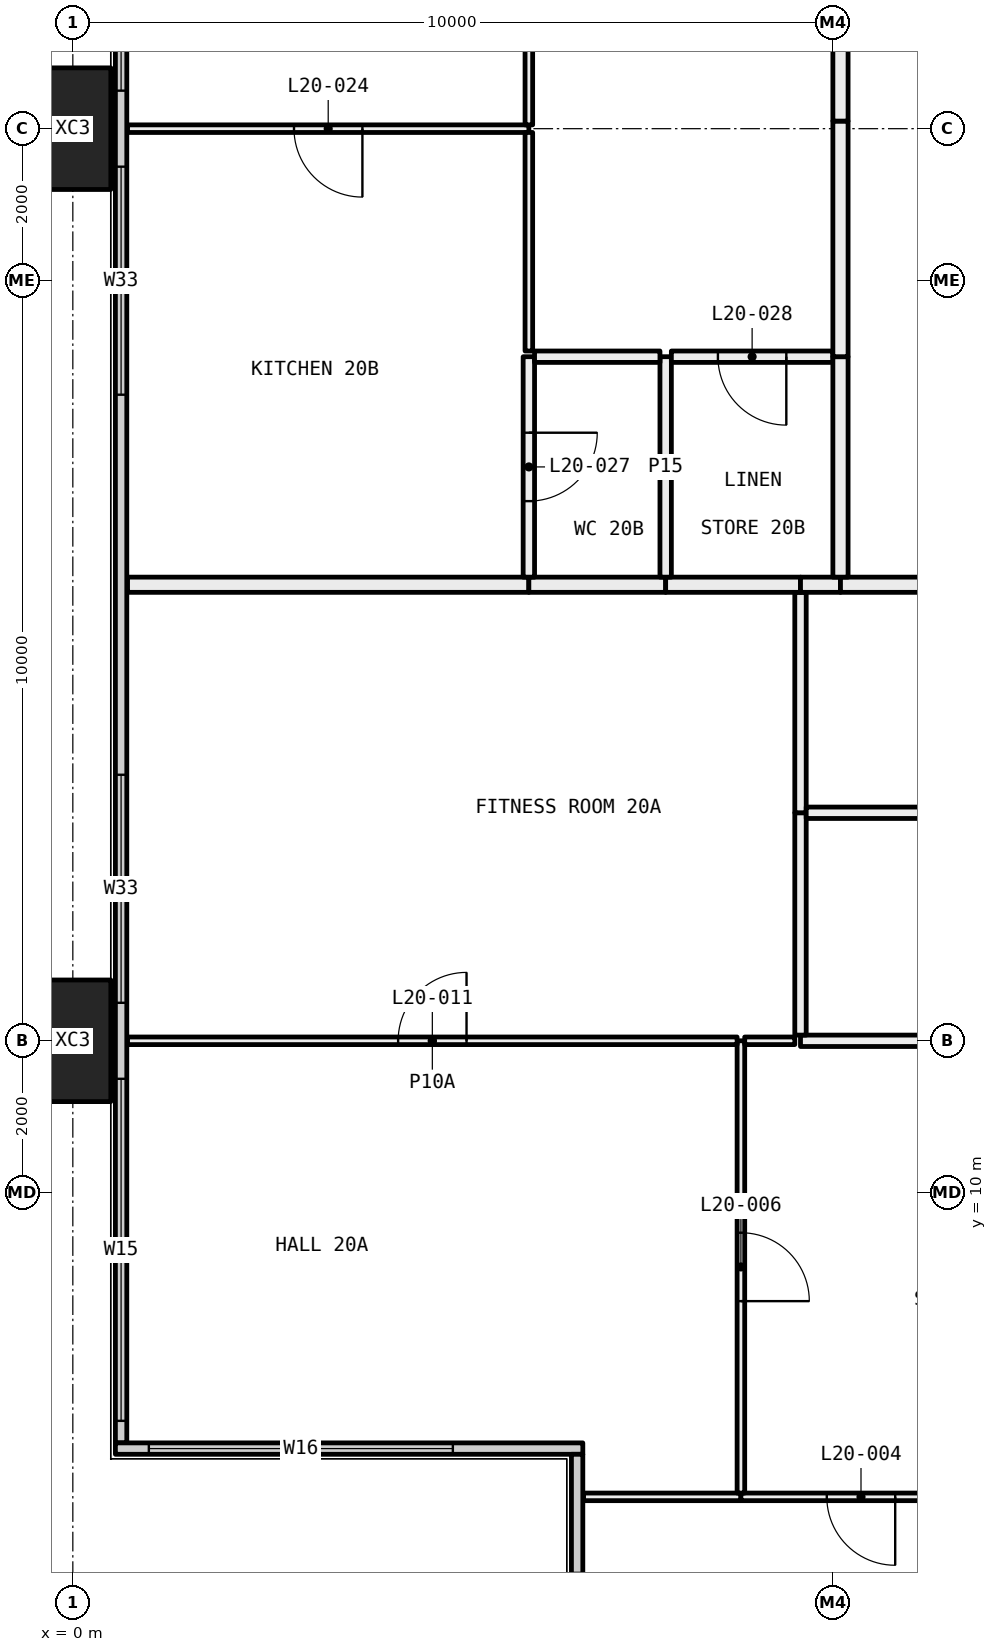
"""IFC4 building model, lengths in metres.
Left out: names, types, materials, properties, quantities, classifications, styles, units other than length and angle.
Written with IfcOpenShell. Run it as: python <this file> out.ifc"""

import sys

from ifc_helpers import new_model, si_unit, direction, frame, frame_2d, origin, origin_2d, place, context, subcontext, project, spatial, rectangle, hollow_rectangle, extrude, element, fill, save


model = new_model("IFC4")
c1 = context("Model", 3, precision=1e-05, world=origin(), true_north=direction((0.0, 1.0)))
c2 = subcontext(c1, "Body", "Model", "MODEL_VIEW")
j1 = project(units=[si_unit("LENGTHUNIT", "METRE"), si_unit("PLANEANGLEUNIT", "RADIAN")], contexts=[c1])
p1 = place(None, origin())
s1 = spatial("IfcSite", under=j1, at=p1, CompositionType="ELEMENT")
p2 = place(p1, origin())
s2 = spatial("IfcBuilding", under=s1, at=p2, CompositionType="ELEMENT")
p3 = place(p2, frame((0.0, 0.0, 81.75)))
s3 = spatial("IfcBuildingStorey", under=s2, at=p3, CompositionType="ELEMENT", Elevation=81.75)
for number, where, z_axis, x_axis in (
    (1, (0.0, 12.0, -0.4), (0.0, 0.0, 1.0), (0.0, 1.0, 0.0)),
    (2, (0.0, 24.0, -0.4), (0.0, 0.0, 1.0), (0.0, 1.0, 0.0)),
):
    element("IfcColumn", number, at=place(p3, frame(where, z_axis=z_axis, x_axis=x_axis)), inside=s3, PredefinedType="COLUMN", context=c2, shape_type="SweptSolid", body=[
        extrude(hollow_rectangle(XDim=1.6, YDim=1.0, WallThickness=0.065, at=origin_2d()), origin(), (0.0, 0.0, 1.0), 3.45),
    ])
p4 = place(p3, frame((0.635, 6.71, 0.0), z_axis=(0.0, 0.0, 1.0), x_axis=(0.0, 1.0, 0.0)))
e3 = element("IfcWall", 3, at=p4, inside=s3, PredefinedType="ELEMENTEDWALL", context=c2, shape_type="SweptSolid", body=[
    extrude(rectangle(XDim=34.58, YDim=0.15, at=frame_2d((17.29, 0.0))), origin(), (0.0, 0.0, 1.0), 3.05),
])
p5 = place(p4, frame((0.29, 0.0, 0.45)))
e4 = element("IfcOpeningElement", 4, at=p5, cuts=e3, PredefinedType="OPENING", context=c2, shape_type="SweptSolid", body=[
    extrude(rectangle(XDim=4.5, YDim=2.55, at=frame_2d((2.25, 1.275))), frame((0.0, 0.085, 0.0), z_axis=(0.0, -1.0, 0.0), x_axis=(1.0, 0.0, 0.0)), (0.0, 0.0, 1.0), 0.17),
])
p6 = place(p4, frame((5.79, 0.0, 0.45)))
e5 = element("IfcOpeningElement", 5, at=p6, cuts=e3, PredefinedType="OPENING", context=c2, shape_type="SweptSolid", body=[
    extrude(rectangle(XDim=3.0, YDim=2.55, at=frame_2d((1.5, 1.275))), frame((0.0, 0.085, 0.0), z_axis=(0.0, -1.0, 0.0), x_axis=(1.0, 0.0, 0.0)), (0.0, 0.0, 1.0), 0.17),
])
p7 = place(p4, frame((13.79, 0.0, 0.45)))
e6 = element("IfcOpeningElement", 6, at=p7, cuts=e3, PredefinedType="OPENING", context=c2, shape_type="SweptSolid", body=[
    extrude(rectangle(XDim=3.0, YDim=2.55, at=frame_2d((1.5, 1.275))), frame((0.0, 0.085, 0.0), z_axis=(0.0, -1.0, 0.0), x_axis=(1.0, 0.0, 0.0)), (0.0, 0.0, 1.0), 0.17),
])
p8 = place(p4, frame((17.79, 0.0, 0.45)))
e7 = element("IfcOpeningElement", 7, at=p8, cuts=e3, PredefinedType="OPENING", context=c2, shape_type="SweptSolid", body=[
    extrude(rectangle(XDim=3.0, YDim=2.55, at=frame_2d((1.5, 1.275))), frame((0.0, 0.085, 0.0), z_axis=(0.0, -1.0, 0.0), x_axis=(1.0, 0.0, 0.0)), (0.0, 0.0, 1.0), 0.17),
])
p9 = place(p4, frame((26.79, 0.0, 0.45)))
e8 = element("IfcOpeningElement", 8, at=p9, cuts=e3, PredefinedType="OPENING", context=c2, shape_type="SweptSolid", body=[
    extrude(rectangle(XDim=2.0, YDim=2.55, at=frame_2d((1.0, 1.275))), frame((0.0, 0.085, 0.0), z_axis=(0.0, -1.0, 0.0), x_axis=(1.0, 0.0, 0.0)), (0.0, 0.0, 1.0), 0.17),
])
p10 = place(p4, frame((29.79, 0.0, 0.45)))
e9 = element("IfcOpeningElement", 9, at=p10, cuts=e3, PredefinedType="OPENING", context=c2, shape_type="SweptSolid", body=[
    extrude(rectangle(XDim=4.5, YDim=2.55, at=frame_2d((2.25, 1.275))), frame((0.0, 0.085, 0.0), z_axis=(0.0, -1.0, 0.0), x_axis=(1.0, 0.0, 0.0)), (0.0, 0.0, 1.0), 0.17),
])
p11 = place(p3, frame((0.56, 6.635, 0.0), z_axis=(0.0, 0.0, 1.0), x_axis=(1.0, 0.0, 0.0)))
e10 = element("IfcWall", 10, at=p11, inside=s3, PredefinedType="ELEMENTEDWALL", context=c2, shape_type="SweptSolid", body=[
    extrude(rectangle(XDim=6.15, YDim=0.15, at=frame_2d((3.075, 0.0))), origin(), (0.0, 0.0, 1.0), 3.05),
])
p12 = place(p11, frame((0.44, 0.0, 0.45)))
e11 = element("IfcOpeningElement", 11, at=p12, cuts=e10, PredefinedType="OPENING", context=c2, shape_type="SweptSolid", body=[
    extrude(rectangle(XDim=4.0, YDim=2.55, at=frame_2d((2.0, 1.275))), frame((0.0, 0.085, 0.0), z_axis=(0.0, -1.0, 0.0), x_axis=(1.0, 0.0, 0.0)), (0.0, 0.0, 1.0), 0.17),
])
p13 = place(p3, frame((6.635, 0.71, 0.0), z_axis=(0.0, 0.0, 1.0), x_axis=(0.0, 1.0, 0.0)))
e12 = element("IfcWall", 12, at=p13, inside=s3, PredefinedType="ELEMENTEDWALL", context=c2, shape_type="SweptSolid", body=[
    extrude(rectangle(XDim=5.85, YDim=0.15, at=frame_2d((2.925, 0.0))), origin(), (0.0, 0.0, 1.0), 3.05),
])
p14 = place(p13, frame((0.29, 0.0, 0.45)))
e13 = element("IfcOpeningElement", 13, at=p14, cuts=e12, PredefinedType="OPENING", context=c2, shape_type="SweptSolid", body=[
    extrude(rectangle(XDim=4.0, YDim=2.55, at=frame_2d((2.0, 1.275))), frame((0.0, 0.085, 0.0), z_axis=(0.0, -1.0, 0.0), x_axis=(1.0, 0.0, 0.0)), (0.0, 0.0, 1.0), 0.17),
])
p15 = place(p3, frame((8.79, 6.0, 0.0), z_axis=(0.0, 0.0, 1.0), x_axis=(-1.0, 0.0, 0.0)))
e14 = element("IfcWall", 14, at=p15, inside=s3, PredefinedType="PARTITIONING", context=c2, shape_type="SweptSolid", body=[
    extrude(rectangle(XDim=2.07, YDim=0.1, at=frame_2d((1.035, 0.0))), origin(), (0.0, 0.0, 1.0), 3.05),
])
p16 = place(p3, frame((11.95, 6.0, 0.0), z_axis=(0.0, 0.0, 1.0), x_axis=(-1.0, 0.0, 0.0)))
e15 = element("IfcWall", 15, at=p16, inside=s3, PredefinedType="PARTITIONING", context=c2, shape_type="SweptSolid", body=[
    extrude(rectangle(XDim=3.16, YDim=0.1, at=frame_2d((1.58, 0.0))), origin(), (0.0, 0.0, 1.0), 2.45),
])
p17 = place(p16, frame((1.13, 0.0, 0.0)))
e16 = element("IfcOpeningElement", 16, at=p17, cuts=e15, PredefinedType="OPENING", context=c2, shape_type="SweptSolid", body=[
    extrude(rectangle(XDim=0.9, YDim=2.1, at=frame_2d((0.45, 1.05))), frame((0.0, 0.06, 0.0), z_axis=(0.0, -1.0, 0.0), x_axis=(1.0, 0.0, 0.0)), (0.0, 0.0, 1.0), 0.12),
])
p18 = place(p3, frame((8.79, 6.05, 0.0), z_axis=(0.0, 0.0, 1.0), x_axis=(0.0, 1.0, 0.0)))
e17 = element("IfcWall", 17, at=p18, inside=s3, PredefinedType="PARTITIONING", context=c2, shape_type="SweptSolid", body=[
    extrude(rectangle(XDim=5.95, YDim=0.1, at=frame_2d((2.975, 0.0))), origin(), (0.0, 0.0, 1.0), 2.45),
])
p19 = place(p18, frame((2.525, 0.0, 0.0)))
e18 = element("IfcOpeningElement", 18, at=p19, cuts=e17, PredefinedType="OPENING", context=c2, shape_type="SweptSolid", body=[
    extrude(rectangle(XDim=0.9, YDim=2.1, at=frame_2d((0.45, 1.05))), frame((0.0, 0.06, 0.0), z_axis=(0.0, -1.0, 0.0), x_axis=(1.0, 0.0, 0.0)), (0.0, 0.0, 1.0), 0.12),
])
p20 = place(p3, frame((8.74, 12.0, 0.0), z_axis=(0.0, 0.0, 1.0), x_axis=(-1.0, 0.0, 0.0)))
e19 = element("IfcWall", 19, at=p20, inside=s3, PredefinedType="PARTITIONING", context=c2, shape_type="SweptSolid", body=[
    extrude(rectangle(XDim=8.02, YDim=0.1, at=frame_2d((4.01, 0.0))), origin(), (0.0, 0.0, 1.0), 2.45),
])
p21 = place(p20, frame((3.56, 0.0, 0.0)))
e20 = element("IfcOpeningElement", 20, at=p21, cuts=e19, PredefinedType="OPENING", context=c2, shape_type="SweptSolid", body=[
    extrude(rectangle(XDim=0.9, YDim=2.1, at=frame_2d((0.45, 1.05))), frame((0.0, 0.06, 0.0), z_axis=(0.0, -1.0, 0.0), x_axis=(1.0, 0.0, 0.0)), (0.0, 0.0, 1.0), 0.12),
])
p22 = place(p3, frame((9.499, 12.0, 0.0), z_axis=(0.0, 0.0, 1.0), x_axis=(-1.0, 0.0, 0.0)))
e21 = element("IfcWall", 21, at=p22, inside=s3, PredefinedType="PARTITIONING", context=c2, shape_type="SweptSolid", body=[
    extrude(rectangle(XDim=0.659, YDim=0.1, at=frame_2d((0.33, 0.0))), origin(), (0.0, 0.0, 1.0), 2.45),
])
p23 = place(p3, frame((11.2, 12.0, 0.0), z_axis=(0.0, 0.0, 1.0), x_axis=(-1.0, 0.0, 0.0)))
e22 = element("IfcWall", 22, at=p23, inside=s3, PredefinedType="PARTITIONING", context=c2, shape_type="SweptSolid", body=[
    extrude(rectangle(XDim=1.626, YDim=0.15, at=frame_2d((0.813, 0.0))), origin(), (0.0, 0.0, 1.0), 2.45),
])
p24 = place(p3, frame((9.574, 12.075, 0.0), z_axis=(0.0, 0.0, 1.0), x_axis=(0.0, 1.0, 0.0)))
e23 = element("IfcWall", 23, at=p24, inside=s3, PredefinedType="PARTITIONING", context=c2, shape_type="SweptSolid", body=[
    extrude(rectangle(XDim=2.925, YDim=0.15, at=frame_2d((1.462, 0.0))), origin(), (0.0, 0.0, 1.0), 2.45),
])
p25 = place(p3, frame((9.574, 15.0, 0.0), z_axis=(0.0, 0.0, 1.0), x_axis=(0.0, 1.0, 0.0)))
e24 = element("IfcWall", 24, at=p25, inside=s3, PredefinedType="PARTITIONING", context=c2, shape_type="SweptSolid", body=[
    extrude(rectangle(XDim=2.9, YDim=0.15, at=frame_2d((1.45, 0.0))), origin(), (0.0, 0.0, 1.0), 3.05),
])
p26 = place(p3, frame((6.0, 18.0, 0.0), z_axis=(0.0, 0.0, 1.0), x_axis=(-1.0, 0.0, 0.0)))
e25 = element("IfcWall", 25, at=p26, inside=s3, PredefinedType="PARTITIONING", context=c2, shape_type="SweptSolid", body=[
    extrude(rectangle(XDim=5.28, YDim=0.2, at=frame_2d((2.64, 0.0))), origin(), (0.0, 0.0, 1.0), 3.05),
])
p27 = place(p3, frame((7.8, 18.0, 0.0), z_axis=(0.0, 0.0, 1.0), x_axis=(-1.0, 0.0, 0.0)))
e26 = element("IfcWall", 26, at=p27, inside=s3, PredefinedType="PARTITIONING", context=c2, shape_type="SweptSolid", body=[
    extrude(rectangle(XDim=1.8, YDim=0.2, at=frame_2d((0.9, 0.0))), origin(), (0.0, 0.0, 1.0), 3.05),
])
p28 = place(p3, frame((9.574, 18.0, 0.0), z_axis=(0.0, 0.0, 1.0), x_axis=(-1.0, 0.0, 0.0)))
e27 = element("IfcWall", 27, at=p28, inside=s3, PredefinedType="PARTITIONING", context=c2, shape_type="SweptSolid", body=[
    extrude(rectangle(XDim=1.774, YDim=0.2, at=frame_2d((0.887, 0.0))), origin(), (0.0, 0.0, 1.0), 3.05),
])
p29 = place(p3, frame((15.0, 15.0, 0.0), z_axis=(0.0, 0.0, 1.0), x_axis=(-1.0, 0.0, 0.0)))
e28 = element("IfcWall", 28, at=p29, inside=s3, PredefinedType="PARTITIONING", context=c2, shape_type="SweptSolid", body=[
    extrude(rectangle(XDim=5.351, YDim=0.15, at=frame_2d((2.676, 0.0))), origin(), (0.0, 0.0, 1.0), 3.05),
])
p30 = place(p3, frame((10.1, 18.0, 0.0), z_axis=(0.0, 0.0, 1.0), x_axis=(-1.0, 0.0, 0.0)))
e29 = element("IfcWall", 29, at=p30, inside=s3, PredefinedType="PARTITIONING", context=c2, shape_type="SweptSolid", body=[
    extrude(rectangle(XDim=0.526, YDim=0.2, at=frame_2d((0.263, 0.0))), origin(), (0.0, 0.0, 1.0), 3.05),
])
p31 = place(p3, frame((15.0, 18.0, 0.0), z_axis=(0.0, 0.0, 1.0), x_axis=(-1.0, 0.0, 0.0)))
e30 = element("IfcWall", 30, at=p31, inside=s3, PredefinedType="PARTITIONING", context=c2, shape_type="SweptSolid", body=[
    extrude(rectangle(XDim=4.9, YDim=0.2, at=frame_2d((2.45, 0.0))), origin(), (0.0, 0.0, 1.0), 3.05),
])
p32 = place(p3, frame((6.0, 24.0, 0.0), z_axis=(0.0, 0.0, 1.0), x_axis=(-1.0, 0.0, 0.0)))
e31 = element("IfcWall", 31, at=p32, inside=s3, PredefinedType="PARTITIONING", context=c2, shape_type="SweptSolid", body=[
    extrude(rectangle(XDim=5.28, YDim=0.1, at=frame_2d((2.64, 0.0))), origin(), (0.0, 0.0, 1.0), 2.45),
])
p33 = place(p32, frame((2.19, 0.0, 0.0)))
e32 = element("IfcOpeningElement", 32, at=p33, cuts=e31, PredefinedType="OPENING", context=c2, shape_type="SweptSolid", body=[
    extrude(rectangle(XDim=0.9, YDim=2.1, at=frame_2d((0.45, 1.05))), frame((0.0, 0.06, 0.0), z_axis=(0.0, -1.0, 0.0), x_axis=(1.0, 0.0, 0.0)), (0.0, 0.0, 1.0), 0.12),
])
p34 = place(p3, frame((6.0, 18.1, 0.0), z_axis=(0.0, 0.0, 1.0), x_axis=(0.0, 1.0, 0.0)))
e33 = element("IfcWall", 33, at=p34, inside=s3, PredefinedType="PARTITIONING", context=c2, shape_type="SweptSolid", body=[
    extrude(rectangle(XDim=2.9, YDim=0.15, at=frame_2d((1.45, 0.0))), origin(), (0.0, 0.0, 1.0), 3.05),
])
p35 = place(p34, frame((1.0, 0.0, 0.0)))
e34 = element("IfcOpeningElement", 34, at=p35, cuts=e33, PredefinedType="OPENING", context=c2, shape_type="SweptSolid", body=[
    extrude(rectangle(XDim=0.9, YDim=2.1, at=frame_2d((0.45, 1.05))), frame((0.0, 0.085, 0.0), z_axis=(0.0, -1.0, 0.0), x_axis=(1.0, 0.0, 0.0)), (0.0, 0.0, 1.0), 0.17),
])
p36 = place(p3, frame((6.0, 21.075, 0.0), z_axis=(0.0, 0.0, 1.0), x_axis=(0.0, 1.0, 0.0)))
e35 = element("IfcWall", 35, at=p36, inside=s3, PredefinedType="PARTITIONING", context=c2, shape_type="SweptSolid", body=[
    extrude(rectangle(XDim=2.875, YDim=0.1, at=frame_2d((1.438, 0.0))), origin(), (0.0, 0.0, 1.0), 2.45),
])
p37 = place(p3, frame((6.0, 24.05, 0.0), z_axis=(0.0, 0.0, 1.0), x_axis=(0.0, 1.0, 0.0)))
e36 = element("IfcWall", 36, at=p37, inside=s3, PredefinedType="PARTITIONING", context=c2, shape_type="SweptSolid", body=[
    extrude(rectangle(XDim=8.95, YDim=0.1, at=frame_2d((4.475, 0.0))), origin(), (0.0, 0.0, 1.0), 2.45),
])
p38 = place(p3, frame((7.8, 18.1, 0.0), z_axis=(0.0, 0.0, 1.0), x_axis=(0.0, 1.0, 0.0)))
e37 = element("IfcWall", 37, at=p38, inside=s3, PredefinedType="PARTITIONING", context=c2, shape_type="SweptSolid", body=[
    extrude(rectangle(XDim=2.9, YDim=0.15, at=frame_2d((1.45, 0.0))), origin(), (0.0, 0.0, 1.0), 3.05),
])
p39 = place(p3, frame((7.725, 21.0, 0.0), z_axis=(0.0, 0.0, 1.0), x_axis=(-1.0, 0.0, 0.0)))
e38 = element("IfcWall", 38, at=p39, inside=s3, PredefinedType="PARTITIONING", context=c2, shape_type="SweptSolid", body=[
    extrude(rectangle(XDim=1.65, YDim=0.15, at=frame_2d((0.825, 0.0))), origin(), (0.0, 0.0, 1.0), 3.05),
])
p40 = place(p3, frame((10.0, 21.0, 0.0), z_axis=(0.0, 0.0, 1.0), x_axis=(-1.0, 0.0, 0.0)))
e39 = element("IfcWall", 39, at=p40, inside=s3, PredefinedType="PARTITIONING", context=c2, shape_type="SweptSolid", body=[
    extrude(rectangle(XDim=2.125, YDim=0.15, at=frame_2d((1.062, 0.0))), origin(), (0.0, 0.0, 1.0), 3.05),
])
p41 = place(p40, frame((0.613, 0.0, 0.0)))
e40 = element("IfcOpeningElement", 40, at=p41, cuts=e39, PredefinedType="OPENING", context=c2, shape_type="SweptSolid", body=[
    extrude(rectangle(XDim=0.9, YDim=2.1, at=frame_2d((0.45, 1.05))), frame((0.0, 0.085, 0.0), z_axis=(0.0, -1.0, 0.0), x_axis=(1.0, 0.0, 0.0)), (0.0, 0.0, 1.0), 0.17),
])
p42 = place(p3, frame((10.1, 18.1, 0.0), z_axis=(0.0, 0.0, 1.0), x_axis=(0.0, 1.0, 0.0)))
e41 = element("IfcWall", 41, at=p42, inside=s3, PredefinedType="PARTITIONING", context=c2, shape_type="SweptSolid", body=[
    extrude(rectangle(XDim=2.9, YDim=0.2, at=frame_2d((1.45, 0.0))), origin(), (0.0, 0.0, 1.0), 3.05),
])
p43 = place(p3, frame((10.1, 21.0, 0.0), z_axis=(0.0, 0.0, 1.0), x_axis=(0.0, 1.0, 0.0)))
e42 = element("IfcWall", 42, at=p43, inside=s3, PredefinedType="PARTITIONING", context=c2, shape_type="SweptSolid", body=[
    extrude(rectangle(XDim=3.1, YDim=0.2, at=frame_2d((1.55, 0.0))), origin(), (0.0, 0.0, 1.0), 2.45),
])
p44 = place(p3, frame((10.1, 24.1, 0.0), z_axis=(0.0, 0.0, 1.0), x_axis=(0.0, 1.0, 0.0)))
e43 = element("IfcWall", 43, at=p44, inside=s3, PredefinedType="PARTITIONING", context=c2, shape_type="SweptSolid", body=[
    extrude(rectangle(XDim=8.9, YDim=0.2, at=frame_2d((4.45, 0.0))), origin(), (0.0, 0.0, 1.0), 3.05),
])
p45 = place(p5, origin())
e44 = element("IfcWindow", 44, at=p45, inside=s3, PartitioningType="SINGLE_PANEL", PredefinedType="WINDOW", context=c2, shape_type="SweptSolid", body=[
    extrude(rectangle(XDim=4.5, YDim=2.55, at=frame_2d((2.25, 1.275))), frame((0.0, 0.03, 0.0), z_axis=(0.0, -1.0, 0.0), x_axis=(1.0, 0.0, 0.0)), (0.0, 0.0, 1.0), 0.06),
])
fill(e4, e44)
p46 = place(p6, origin())
e45 = element("IfcWindow", 45, at=p46, inside=s3, PartitioningType="SINGLE_PANEL", PredefinedType="WINDOW", context=c2, shape_type="SweptSolid", body=[
    extrude(rectangle(XDim=3.0, YDim=2.55, at=frame_2d((1.5, 1.275))), frame((0.0, 0.03, 0.0), z_axis=(0.0, -1.0, 0.0), x_axis=(1.0, 0.0, 0.0)), (0.0, 0.0, 1.0), 0.06),
])
fill(e5, e45)
p47 = place(p7, origin())
e46 = element("IfcWindow", 46, at=p47, inside=s3, PartitioningType="SINGLE_PANEL", PredefinedType="WINDOW", context=c2, shape_type="SweptSolid", body=[
    extrude(rectangle(XDim=3.0, YDim=2.55, at=frame_2d((1.5, 1.275))), frame((0.0, 0.03, 0.0), z_axis=(0.0, -1.0, 0.0), x_axis=(1.0, 0.0, 0.0)), (0.0, 0.0, 1.0), 0.06),
])
fill(e6, e46)
p48 = place(p8, origin())
e47 = element("IfcWindow", 47, at=p48, inside=s3, PartitioningType="SINGLE_PANEL", PredefinedType="WINDOW", context=c2, shape_type="SweptSolid", body=[
    extrude(rectangle(XDim=3.0, YDim=2.55, at=frame_2d((1.5, 1.275))), frame((0.0, 0.03, 0.0), z_axis=(0.0, -1.0, 0.0), x_axis=(1.0, 0.0, 0.0)), (0.0, 0.0, 1.0), 0.06),
])
fill(e7, e47)
p49 = place(p12, origin())
e48 = element("IfcWindow", 48, at=p49, inside=s3, PartitioningType="SINGLE_PANEL", PredefinedType="WINDOW", context=c2, shape_type="SweptSolid", body=[
    extrude(rectangle(XDim=4.0, YDim=2.55, at=frame_2d((2.0, 1.275))), frame((0.0, 0.03, 0.0), z_axis=(0.0, -1.0, 0.0), x_axis=(1.0, 0.0, 0.0)), (0.0, 0.0, 1.0), 0.06),
])
fill(e11, e48)
p50 = place(p17, origin())
e49 = element("IfcDoor", 49, at=p50, inside=s3, OperationType="SINGLE_SWING_RIGHT", PredefinedType="DOOR", context=c2, shape_type="SweptSolid", body=[
    extrude(rectangle(XDim=0.9, YDim=2.1, at=frame_2d((0.45, 1.05))), frame((0.0, 0.025, 0.0), z_axis=(0.0, -1.0, 0.0), x_axis=(1.0, 0.0, 0.0)), (0.0, 0.0, 1.0), 0.05),
])
fill(e16, e49)
p51 = place(p19, frame((0.9, 0.0, 0.0), x_axis=(-1.0, 0.0, 0.0)))
e50 = element("IfcDoor", 50, at=p51, inside=s3, OperationType="SINGLE_SWING_LEFT", PredefinedType="DOOR", context=c2, shape_type="SweptSolid", body=[
    extrude(rectangle(XDim=0.9, YDim=2.1, at=frame_2d((0.45, 1.05))), frame((0.0, 0.025, 0.0), z_axis=(0.0, -1.0, 0.0), x_axis=(1.0, 0.0, 0.0)), (0.0, 0.0, 1.0), 0.05),
])
fill(e18, e50)
p52 = place(p21, frame((0.9, 0.0, 0.0), x_axis=(-1.0, 0.0, 0.0)))
e51 = element("IfcDoor", 51, at=p52, inside=s3, OperationType="SINGLE_SWING_LEFT", PredefinedType="DOOR", context=c2, shape_type="SweptSolid", body=[
    extrude(rectangle(XDim=0.9, YDim=2.1, at=frame_2d((0.45, 1.05))), frame((0.0, 0.025, 0.0), z_axis=(0.0, -1.0, 0.0), x_axis=(1.0, 0.0, 0.0)), (0.0, 0.0, 1.0), 0.05),
])
fill(e20, e51)
p53 = place(p33, origin())
e52 = element("IfcDoor", 52, at=p53, inside=s3, OperationType="SINGLE_SWING_RIGHT", PredefinedType="DOOR", context=c2, shape_type="SweptSolid", body=[
    extrude(rectangle(XDim=0.9, YDim=2.1, at=frame_2d((0.45, 1.05))), frame((0.0, 0.025, 0.0), z_axis=(0.0, -1.0, 0.0), x_axis=(1.0, 0.0, 0.0)), (0.0, 0.0, 1.0), 0.05),
])
fill(e32, e52)
p54 = place(p35, frame((0.9, 0.0, 0.0), x_axis=(-1.0, 0.0, 0.0)))
e53 = element("IfcDoor", 53, at=p54, inside=s3, OperationType="SINGLE_SWING_RIGHT", PredefinedType="DOOR", context=c2, shape_type="SweptSolid", body=[
    extrude(rectangle(XDim=0.9, YDim=2.1, at=frame_2d((0.45, 1.05))), frame((0.0, 0.025, 0.0), z_axis=(0.0, -1.0, 0.0), x_axis=(1.0, 0.0, 0.0)), (0.0, 0.0, 1.0), 0.05),
])
fill(e34, e53)
p55 = place(p41, origin())
e54 = element("IfcDoor", 54, at=p55, inside=s3, OperationType="SINGLE_SWING_RIGHT", PredefinedType="DOOR", context=c2, shape_type="SweptSolid", body=[
    extrude(rectangle(XDim=0.9, YDim=2.1, at=frame_2d((0.45, 1.05))), frame((0.0, 0.025, 0.0), z_axis=(0.0, -1.0, 0.0), x_axis=(1.0, 0.0, 0.0)), (0.0, 0.0, 1.0), 0.05),
])
fill(e40, e54)
save(model, sys.argv[1])
